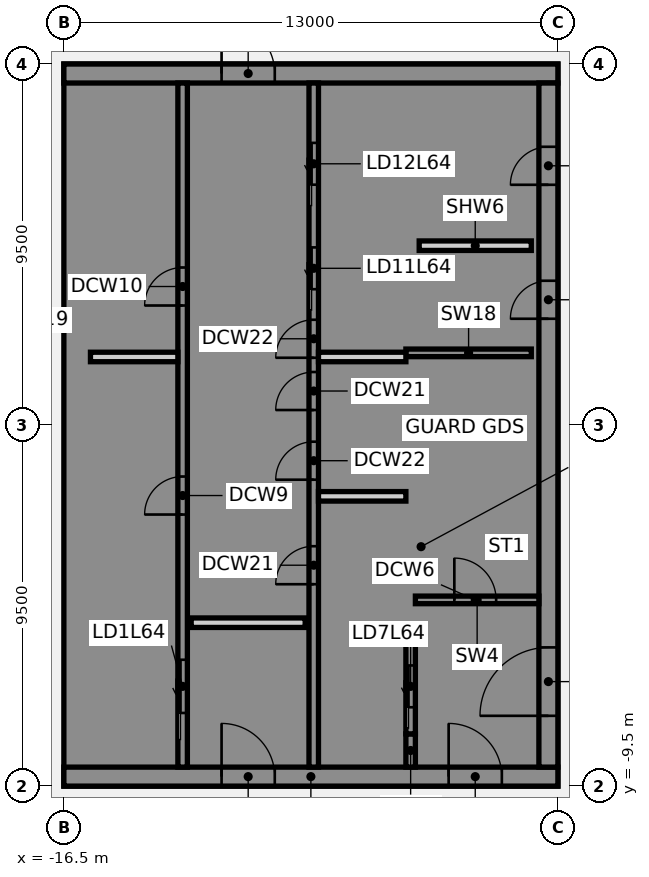
"""IFC4 building model, lengths in metres.
Left out: names, types, materials, properties, quantities, classifications, styles, units other than length and angle.
Written with IfcOpenShell. Run it as: python <this file> out.ifc"""

import sys

from ifc_helpers import new_model, si_unit, direction, frame, frame_2d, origin, place, context, subcontext, project, spatial, polyline, rectangle, outline, extrude, element, fill, save


model = new_model("IFC4")
c1 = context("Model", 3, precision=1e-05, world=origin(), true_north=direction((0.0, 1.0)))
c2 = subcontext(c1, "Body", "Model", "MODEL_VIEW")
j1 = project(units=[si_unit("LENGTHUNIT", "METRE"), si_unit("PLANEANGLEUNIT", "RADIAN")], contexts=[c1])
p1 = place(None, origin())
s1 = spatial("IfcSite", under=j1, at=p1, CompositionType="ELEMENT")
p2 = place(p1, origin())
s2 = spatial("IfcBuilding", under=s1, at=p2, CompositionType="ELEMENT")
p3 = place(p2, frame((0.0, 0.0, 252.3)))
s3 = spatial("IfcBuildingStorey", under=s2, at=p3, CompositionType="ELEMENT", Elevation=252.3)
p4 = place(p3, frame((-16.5, -9.25, 0.0), z_axis=(0.0, 0.0, 1.0), x_axis=(1.0, 0.0, 0.0)))
e1 = element("IfcWall", 1, at=p4, inside=s3, PredefinedType="SHEAR", context=c2, shape_type="SweptSolid", body=[
    extrude(rectangle(XDim=13.0, YDim=0.5, at=frame_2d((6.5, 0.0))), origin(), (0.0, 0.0, 1.0), 4.36),
])
p5 = place(p4, frame((4.15, 0.0, 0.0)))
e2 = element("IfcOpeningElement", 2, at=p5, cuts=e1, PredefinedType="OPENING", context=c2, shape_type="SweptSolid", body=[
    extrude(rectangle(XDim=1.4, YDim=2.1, at=frame_2d((0.7, 1.05))), frame((0.0, 0.26, 0.0), z_axis=(0.0, -1.0, 0.0), x_axis=(1.0, 0.0, 0.0)), (0.0, 0.0, 1.0), 0.52),
])
p6 = place(p4, frame((10.125, 0.0, 0.0)))
e3 = element("IfcOpeningElement", 3, at=p6, cuts=e1, PredefinedType="OPENING", context=c2, shape_type="SweptSolid", body=[
    extrude(rectangle(XDim=1.4, YDim=2.1, at=frame_2d((0.7, 1.05))), frame((0.0, 0.26, 0.0), z_axis=(0.0, -1.0, 0.0), x_axis=(1.0, 0.0, 0.0)), (0.0, 0.0, 1.0), 0.52),
])
p7 = place(p3, origin())
e4 = element("IfcWall", 4, at=p7, inside=s3, PredefinedType="SHEAR", context=c2, shape_type="SweptSolid", body=[
    extrude(outline(polyline([(-13.5, -8.125), (-16.0, -8.125), (-16.0, -5.625), (-13.5, -5.625), (-13.5, -5.375), (-16.0, -5.375), (-16.0, 5.375), (-13.5, 5.375), (-13.5, 5.625), (-16.0, 5.625), (-16.0, 8.125), (-13.5, 8.125), (-13.5, 9.0), (-16.0, 9.0), (-16.5, 9.0), (-16.5, -9.0), (-16.0, -9.0), (-13.5, -9.0), (-13.5, -8.125)])), origin(), (0.0, 0.0, 1.0), 4.36),
])
p8 = place(p3, frame((-16.5, 9.25, 0.0), z_axis=(0.0, 0.0, 1.0), x_axis=(1.0, 0.0, 0.0)))
e5 = element("IfcWall", 5, at=p8, inside=s3, PredefinedType="SHEAR", context=c2, shape_type="SweptSolid", body=[
    extrude(rectangle(XDim=13.0, YDim=0.5, at=frame_2d((6.5, 0.0))), origin(), (0.0, 0.0, 1.0), 4.36),
])
p9 = place(p8, frame((4.15, 0.0, 0.0)))
e6 = element("IfcOpeningElement", 6, at=p9, cuts=e5, PredefinedType="OPENING", context=c2, shape_type="SweptSolid", body=[
    extrude(rectangle(XDim=1.4, YDim=2.1, at=frame_2d((0.7, 1.05))), frame((0.0, 0.26, 0.0), z_axis=(0.0, -1.0, 0.0), x_axis=(1.0, 0.0, 0.0)), (0.0, 0.0, 1.0), 0.52),
])
p10 = place(p3, origin())
e7 = element("IfcWall", 7, at=p10, inside=s3, PredefinedType="SHEAR", context=c2, shape_type="SweptSolid", body=[
    extrude(outline(polyline([(-9.8, -5.375), (-9.8, -5.625), (-7.5, -5.625), (-7.25, -5.625), (-7.25, 9.0), (-7.5, 9.0), (-9.8, 9.0), (-9.8, 8.125), (-7.5, 8.125), (-7.5, 5.625), (-9.8, 5.625), (-9.8, 5.375), (-7.5, 5.375), (-7.5, 2.875), (-9.8, 2.875), (-9.8, 2.625), (-7.5, 2.625), (-7.5, -5.375), (-9.8, -5.375)])), origin(), (0.0, 0.0, 1.0), 4.36),
])
p11 = place(p3, origin())
e8 = element("IfcWall", 8, at=p11, inside=s3, PredefinedType="SHEAR", context=c2, shape_type="SweptSolid", body=[
    extrude(outline(polyline([(-7.5, -8.125), (-9.55, -8.125), (-9.55, -5.625), (-9.8, -5.625), (-9.8, -8.125), (-9.8, -9.0), (-7.5, -9.0), (-7.5, -8.125)])), origin(), (0.0, 0.0, 1.0), 4.36),
])
p12 = place(p3, frame((-7.375, -9.0, 0.0), z_axis=(0.0, 0.0, 1.0), x_axis=(0.0, 1.0, 0.0)))
e9 = element("IfcWall", 9, at=p12, inside=s3, PredefinedType="SHEAR", context=c2, shape_type="SweptSolid", body=[
    extrude(rectangle(XDim=0.875, YDim=0.25, at=frame_2d((0.438, 0.0))), origin(), (0.0, 0.0, 1.0), 4.36),
])
p13 = place(p3, frame((-7.5, 1.9, 0.0), z_axis=(0.0, 0.0, 1.0), x_axis=(1.0, 0.0, 0.0)))
e10 = element("IfcWall", 10, at=p13, inside=s3, PredefinedType="SHEAR", context=c2, shape_type="SweptSolid", body=[
    extrude(rectangle(XDim=3.3, YDim=0.2, at=frame_2d((1.65, 0.0))), origin(), (0.0, 0.0, 1.0), 4.36),
])
p14 = place(p3, frame((-13.375, -9.0, 0.0), z_axis=(0.0, 0.0, 1.0), x_axis=(0.0, 1.0, 0.0)))
e11 = element("IfcWall", 11, at=p14, inside=s3, PredefinedType="SHEAR", context=c2, shape_type="SweptSolid", body=[
    extrude(rectangle(XDim=18.0, YDim=0.25, at=frame_2d((9.0, 0.0))), origin(), (0.0, 0.0, 1.0), 4.36),
])
p15 = place(p14, frame((1.425, 0.0, 0.0)))
e12 = element("IfcOpeningElement", 12, at=p15, cuts=e11, PredefinedType="OPENING", context=c2, shape_type="SweptSolid", body=[
    extrude(rectangle(XDim=1.4, YDim=2.1, at=frame_2d((0.7, 1.05))), frame((0.0, 0.135, 0.0), z_axis=(0.0, -1.0, 0.0), x_axis=(1.0, 0.0, 0.0)), (0.0, 0.0, 1.0), 0.27),
])
p16 = place(p14, frame((6.646, 0.0, 0.0)))
e13 = element("IfcOpeningElement", 13, at=p16, cuts=e11, PredefinedType="OPENING", context=c2, shape_type="SweptSolid", body=[
    extrude(rectangle(XDim=1.0, YDim=2.1, at=frame_2d((0.5, 1.05))), frame((0.0, 0.135, 0.0), z_axis=(0.0, -1.0, 0.0), x_axis=(1.0, 0.0, 0.0)), (0.0, 0.0, 1.0), 0.27),
])
p17 = place(p14, frame((12.146, 0.0, 0.0)))
e14 = element("IfcOpeningElement", 14, at=p17, cuts=e11, PredefinedType="OPENING", context=c2, shape_type="SweptSolid", body=[
    extrude(rectangle(XDim=1.0, YDim=2.1, at=frame_2d((0.5, 1.05))), frame((0.0, 0.135, 0.0), z_axis=(0.0, -1.0, 0.0), x_axis=(1.0, 0.0, 0.0)), (0.0, 0.0, 1.0), 0.27),
])
p18 = place(p3, frame((-9.925, -9.0, 0.0), z_axis=(0.0, 0.0, 1.0), x_axis=(0.0, 1.0, 0.0)))
e15 = element("IfcWall", 15, at=p18, inside=s3, PredefinedType="SHEAR", context=c2, shape_type="SweptSolid", body=[
    extrude(rectangle(XDim=18.0, YDim=0.25, at=frame_2d((9.0, 0.0))), origin(), (0.0, 0.0, 1.0), 4.36),
])
p19 = place(p18, frame((12.575, 0.0, 0.0)))
e16 = element("IfcOpeningElement", 16, at=p19, cuts=e15, PredefinedType="OPENING", context=c2, shape_type="SweptSolid", body=[
    extrude(rectangle(XDim=1.1, YDim=2.1, at=frame_2d((0.55, 1.05))), frame((0.0, 0.135, 0.0), z_axis=(0.0, -1.0, 0.0), x_axis=(1.0, 0.0, 0.0)), (0.0, 0.0, 1.0), 0.27),
])
p20 = place(p18, frame((15.325, 0.0, 0.0)))
e17 = element("IfcOpeningElement", 17, at=p20, cuts=e15, PredefinedType="OPENING", context=c2, shape_type="SweptSolid", body=[
    extrude(rectangle(XDim=1.1, YDim=2.1, at=frame_2d((0.55, 1.05))), frame((0.0, 0.135, 0.0), z_axis=(0.0, -1.0, 0.0), x_axis=(1.0, 0.0, 0.0)), (0.0, 0.0, 1.0), 0.27),
])
p21 = place(p18, frame((4.812, 0.0, 0.0)))
e18 = element("IfcOpeningElement", 18, at=p21, cuts=e15, PredefinedType="OPENING", context=c2, shape_type="SweptSolid", body=[
    extrude(rectangle(XDim=1.0, YDim=2.1, at=frame_2d((0.5, 1.05))), frame((0.0, 0.135, 0.0), z_axis=(0.0, -1.0, 0.0), x_axis=(1.0, 0.0, 0.0)), (0.0, 0.0, 1.0), 0.27),
])
p22 = place(p18, frame((7.562, 0.0, 0.0)))
e19 = element("IfcOpeningElement", 19, at=p22, cuts=e15, PredefinedType="OPENING", context=c2, shape_type="SweptSolid", body=[
    extrude(rectangle(XDim=1.0, YDim=2.1, at=frame_2d((0.5, 1.05))), frame((0.0, 0.135, 0.0), z_axis=(0.0, -1.0, 0.0), x_axis=(1.0, 0.0, 0.0)), (0.0, 0.0, 1.0), 0.27),
])
p23 = place(p18, frame((9.396, 0.0, 0.0)))
e20 = element("IfcOpeningElement", 20, at=p23, cuts=e15, PredefinedType="OPENING", context=c2, shape_type="SweptSolid", body=[
    extrude(rectangle(XDim=1.0, YDim=2.1, at=frame_2d((0.5, 1.05))), frame((0.0, 0.135, 0.0), z_axis=(0.0, -1.0, 0.0), x_axis=(1.0, 0.0, 0.0)), (0.0, 0.0, 1.0), 0.27),
])
p24 = place(p18, frame((10.771, 0.0, 0.0)))
e21 = element("IfcOpeningElement", 21, at=p24, cuts=e15, PredefinedType="OPENING", context=c2, shape_type="SweptSolid", body=[
    extrude(rectangle(XDim=1.0, YDim=2.1, at=frame_2d((0.5, 1.05))), frame((0.0, 0.135, 0.0), z_axis=(0.0, -1.0, 0.0), x_axis=(1.0, 0.0, 0.0)), (0.0, 0.0, 1.0), 0.27),
])
p25 = place(p3, frame((-7.375, -8.125, 0.0), z_axis=(0.0, 0.0, 1.0), x_axis=(0.0, 1.0, 0.0)))
e22 = element("IfcWall", 22, at=p25, inside=s3, PredefinedType="SHEAR", context=c2, shape_type="SweptSolid", body=[
    extrude(rectangle(XDim=2.5, YDim=0.25, at=frame_2d((1.25, 0.0))), origin(), (0.0, 0.0, 1.0), 4.36),
])
p26 = place(p25, frame((0.7, 0.0, 0.0)))
e23 = element("IfcOpeningElement", 23, at=p26, cuts=e22, PredefinedType="OPENING", context=c2, shape_type="SweptSolid", body=[
    extrude(rectangle(XDim=1.1, YDim=2.1, at=frame_2d((0.55, 1.05))), frame((0.0, 0.135, 0.0), z_axis=(0.0, -1.0, 0.0), x_axis=(1.0, 0.0, 0.0)), (0.0, 0.0, 1.0), 0.27),
])
p27 = place(p3, frame((-3.75, -9.0, 0.0), z_axis=(0.0, 0.0, 1.0), x_axis=(0.0, 1.0, 0.0)))
e24 = element("IfcWall", 24, at=p27, inside=s3, PredefinedType="SHEAR", context=c2, shape_type="SweptSolid", body=[
    extrude(rectangle(XDim=18.0, YDim=0.5, at=frame_2d((9.0, 0.0))), origin(), (0.0, 0.0, 1.0), 4.36),
])
p28 = place(p27, frame((1.35, 0.0, 0.0)))
e25 = element("IfcOpeningElement", 25, at=p28, cuts=e24, PredefinedType="OPENING", context=c2, shape_type="SweptSolid", body=[
    extrude(rectangle(XDim=1.8, YDim=2.1, at=frame_2d((0.9, 1.05))), frame((0.0, 0.26, 0.0), z_axis=(0.0, -1.0, 0.0), x_axis=(1.0, 0.0, 0.0)), (0.0, 0.0, 1.0), 0.52),
])
p29 = place(p27, frame((11.798, 0.0, 0.0)))
e26 = element("IfcOpeningElement", 26, at=p29, cuts=e24, PredefinedType="OPENING", context=c2, shape_type="SweptSolid", body=[
    extrude(rectangle(XDim=1.0, YDim=2.1, at=frame_2d((0.5, 1.05))), frame((0.0, 0.26, 0.0), z_axis=(0.0, -1.0, 0.0), x_axis=(1.0, 0.0, 0.0)), (0.0, 0.0, 1.0), 0.52),
])
p30 = place(p27, frame((15.323, 0.0, 0.0)))
e27 = element("IfcOpeningElement", 27, at=p30, cuts=e24, PredefinedType="OPENING", context=c2, shape_type="SweptSolid", body=[
    extrude(rectangle(XDim=1.0, YDim=2.1, at=frame_2d((0.5, 1.05))), frame((0.0, 0.26, 0.0), z_axis=(0.0, -1.0, 0.0), x_axis=(1.0, 0.0, 0.0)), (0.0, 0.0, 1.0), 0.52),
])
p31 = place(p3, frame((-7.15, 4.72, 0.0), z_axis=(0.0, 0.0, 1.0), x_axis=(1.0, 0.0, 0.0)))
e28 = element("IfcWall", 28, at=p31, inside=s3, PredefinedType="PARTITIONING", context=c2, shape_type="SweptSolid", body=[
    extrude(rectangle(XDim=2.95, YDim=0.25, at=frame_2d((1.475, 0.0))), origin(), (0.0, 0.0, 1.0), 4.36),
])
p32 = place(p3, frame((-7.25, -4.6, 0.0), z_axis=(0.0, 0.0, 1.0), x_axis=(1.0, 0.0, 0.0)))
e29 = element("IfcWall", 29, at=p32, inside=s3, PredefinedType="SHEAR", context=c2, shape_type="SweptSolid", body=[
    extrude(rectangle(XDim=3.25, YDim=0.2, at=frame_2d((1.625, 0.0))), origin(), (0.0, 0.0, 1.0), 4.36),
])
p33 = place(p32, frame((1.025, 0.0, 0.0)))
e30 = element("IfcOpeningElement", 30, at=p33, cuts=e29, PredefinedType="OPENING", context=c2, shape_type="SweptSolid", body=[
    extrude(rectangle(XDim=1.1, YDim=2.1, at=frame_2d((0.55, 1.05))), frame((0.0, 0.11, 0.0), z_axis=(0.0, -1.0, 0.0), x_axis=(1.0, 0.0, 0.0)), (0.0, 0.0, 1.0), 0.22),
])
p34 = place(p3, frame((-13.15, -5.2, 0.0), z_axis=(0.0, 0.0, 1.0), x_axis=(1.0, 0.0, 0.0)))
e31 = element("IfcWall", 31, at=p34, inside=s3, PredefinedType="PARTITIONING", context=c2, shape_type="SweptSolid", body=[
    extrude(rectangle(XDim=3.0, YDim=0.25, at=frame_2d((1.5, 0.0))), origin(), (0.0, 0.0, 1.0), 4.36),
])
for number, where, z_axis, x_axis in (
    (32, (-15.8, 1.792, 0.0), (0.0, 0.0, 1.0), (1.0, 0.0, 0.0)),
    (33, (-9.8, -1.875, 0.0), (0.0, 0.0, 1.0), (1.0, 0.0, 0.0)),
    (34, (-9.8, 1.792, 0.0), (0.0, 0.0, 1.0), (1.0, 0.0, 0.0)),
):
    element("IfcWall", number, at=place(p3, frame(where, z_axis=z_axis, x_axis=x_axis)), inside=s3, PredefinedType="PARTITIONING", context=c2, shape_type="SweptSolid", body=[
        extrude(rectangle(XDim=2.3, YDim=0.25, at=frame_2d((1.15, 0.0))), origin(), (0.0, 0.0, 1.0), 4.36),
    ])
p35 = place(p5, origin())
e35 = element("IfcDoor", 35, at=p35, inside=s3, OperationType="SINGLE_SWING_LEFT", PredefinedType="DOOR", context=c2, shape_type="SweptSolid", body=[
    extrude(rectangle(XDim=1.4, YDim=2.1, at=frame_2d((0.7, 1.05))), frame((0.0, 0.025, 0.0), z_axis=(0.0, -1.0, 0.0), x_axis=(1.0, 0.0, 0.0)), (0.0, 0.0, 1.0), 0.05),
])
fill(e2, e35)
p36 = place(p6, origin())
e36 = element("IfcDoor", 36, at=p36, inside=s3, OperationType="SINGLE_SWING_LEFT", PredefinedType="DOOR", context=c2, shape_type="SweptSolid", body=[
    extrude(rectangle(XDim=1.4, YDim=2.1, at=frame_2d((0.7, 1.05))), frame((0.0, 0.025, 0.0), z_axis=(0.0, -1.0, 0.0), x_axis=(1.0, 0.0, 0.0)), (0.0, 0.0, 1.0), 0.05),
])
fill(e3, e36)
p37 = place(p28, origin())
e37 = element("IfcDoor", 37, at=p37, inside=s3, OperationType="SINGLE_SWING_LEFT", PredefinedType="DOOR", context=c2, shape_type="SweptSolid", body=[
    extrude(rectangle(XDim=1.8, YDim=2.1, at=frame_2d((0.9, 1.05))), frame((0.0, 0.025, 0.0), z_axis=(0.0, -1.0, 0.0), x_axis=(1.0, 0.0, 0.0)), (0.0, 0.0, 1.0), 0.05),
])
fill(e25, e37)
p38 = place(p29, origin())
e38 = element("IfcDoor", 38, at=p38, inside=s3, OperationType="SINGLE_SWING_LEFT", PredefinedType="DOOR", context=c2, shape_type="SweptSolid", body=[
    extrude(rectangle(XDim=1.0, YDim=2.1, at=frame_2d((0.5, 1.05))), frame((0.0, 0.225, 0.0), z_axis=(0.0, -1.0, 0.0), x_axis=(1.0, 0.0, 0.0)), (0.0, 0.0, 1.0), 0.05),
])
fill(e26, e38)
p39 = place(p30, origin())
e39 = element("IfcDoor", 39, at=p39, inside=s3, OperationType="SINGLE_SWING_LEFT", PredefinedType="DOOR", context=c2, shape_type="SweptSolid", body=[
    extrude(rectangle(XDim=1.0, YDim=2.1, at=frame_2d((0.5, 1.05))), frame((0.0, 0.225, 0.0), z_axis=(0.0, -1.0, 0.0), x_axis=(1.0, 0.0, 0.0)), (0.0, 0.0, 1.0), 0.05),
])
fill(e27, e39)
p40 = place(p33, origin())
e40 = element("IfcDoor", 40, at=p40, inside=s3, OperationType="SINGLE_SWING_LEFT", PredefinedType="DOOR", context=c2, shape_type="SweptSolid", body=[
    extrude(rectangle(XDim=1.1, YDim=2.1, at=frame_2d((0.55, 1.05))), frame((0.0, 0.025, 0.0), z_axis=(0.0, -1.0, 0.0), x_axis=(1.0, 0.0, 0.0)), (0.0, 0.0, 1.0), 0.05),
])
fill(e30, e40)
p41 = place(p15, origin())
e41 = element("IfcDoor", 41, at=p41, inside=s3, OperationType="SLIDING_TO_LEFT", PredefinedType="DOOR", context=c2, shape_type="SweptSolid", body=[
    extrude(rectangle(XDim=1.4, YDim=2.1, at=frame_2d((0.7, 1.05))), frame((0.0, 0.025, 0.0), z_axis=(0.0, -1.0, 0.0), x_axis=(1.0, 0.0, 0.0)), (0.0, 0.0, 1.0), 0.05),
])
fill(e12, e41)
p42 = place(p26, origin())
e42 = element("IfcDoor", 42, at=p42, inside=s3, OperationType="SLIDING_TO_LEFT", PredefinedType="DOOR", context=c2, shape_type="SweptSolid", body=[
    extrude(rectangle(XDim=1.1, YDim=2.1, at=frame_2d((0.55, 1.05))), frame((0.0, 0.025, 0.0), z_axis=(0.0, -1.0, 0.0), x_axis=(1.0, 0.0, 0.0)), (0.0, 0.0, 1.0), 0.05),
])
fill(e23, e42)
p43 = place(p19, origin())
e43 = element("IfcDoor", 43, at=p43, inside=s3, OperationType="SLIDING_TO_LEFT", PredefinedType="DOOR", context=c2, shape_type="SweptSolid", body=[
    extrude(rectangle(XDim=1.1, YDim=2.1, at=frame_2d((0.55, 1.05))), frame((0.0, 0.025, 0.0), z_axis=(0.0, -1.0, 0.0), x_axis=(1.0, 0.0, 0.0)), (0.0, 0.0, 1.0), 0.05),
])
fill(e16, e43)
p44 = place(p20, origin())
e44 = element("IfcDoor", 44, at=p44, inside=s3, OperationType="SLIDING_TO_LEFT", PredefinedType="DOOR", context=c2, shape_type="SweptSolid", body=[
    extrude(rectangle(XDim=1.1, YDim=2.1, at=frame_2d((0.55, 1.05))), frame((0.0, 0.025, 0.0), z_axis=(0.0, -1.0, 0.0), x_axis=(1.0, 0.0, 0.0)), (0.0, 0.0, 1.0), 0.05),
])
fill(e17, e44)
p45 = place(p9, origin())
e45 = element("IfcDoor", 45, at=p45, inside=s3, OperationType="SINGLE_SWING_LEFT", PredefinedType="DOOR", context=c2, shape_type="SweptSolid", body=[
    extrude(rectangle(XDim=1.4, YDim=2.1, at=frame_2d((0.7, 1.05))), frame((0.0, 0.025, 0.0), z_axis=(0.0, -1.0, 0.0), x_axis=(1.0, 0.0, 0.0)), (0.0, 0.0, 1.0), 0.05),
])
fill(e6, e45)
p46 = place(p16, origin())
e46 = element("IfcDoor", 46, at=p46, inside=s3, OperationType="SINGLE_SWING_LEFT", PredefinedType="DOOR", context=c2, shape_type="SweptSolid", body=[
    extrude(rectangle(XDim=1.0, YDim=2.1, at=frame_2d((0.5, 1.05))), frame((0.0, 0.025, 0.0), z_axis=(0.0, -1.0, 0.0), x_axis=(1.0, 0.0, 0.0)), (0.0, 0.0, 1.0), 0.05),
])
fill(e13, e46)
p47 = place(p17, origin())
e47 = element("IfcDoor", 47, at=p47, inside=s3, OperationType="SINGLE_SWING_LEFT", PredefinedType="DOOR", context=c2, shape_type="SweptSolid", body=[
    extrude(rectangle(XDim=1.0, YDim=2.1, at=frame_2d((0.5, 1.05))), frame((0.0, 0.025, 0.0), z_axis=(0.0, -1.0, 0.0), x_axis=(1.0, 0.0, 0.0)), (0.0, 0.0, 1.0), 0.05),
])
fill(e14, e47)
p48 = place(p21, origin())
e48 = element("IfcDoor", 48, at=p48, inside=s3, OperationType="SINGLE_SWING_LEFT", PredefinedType="DOOR", context=c2, shape_type="SweptSolid", body=[
    extrude(rectangle(XDim=1.0, YDim=2.1, at=frame_2d((0.5, 1.05))), frame((0.0, 0.025, 0.0), z_axis=(0.0, -1.0, 0.0), x_axis=(1.0, 0.0, 0.0)), (0.0, 0.0, 1.0), 0.05),
])
fill(e18, e48)
p49 = place(p22, origin())
e49 = element("IfcDoor", 49, at=p49, inside=s3, OperationType="SINGLE_SWING_LEFT", PredefinedType="DOOR", context=c2, shape_type="SweptSolid", body=[
    extrude(rectangle(XDim=1.0, YDim=2.1, at=frame_2d((0.5, 1.05))), frame((0.0, 0.025, 0.0), z_axis=(0.0, -1.0, 0.0), x_axis=(1.0, 0.0, 0.0)), (0.0, 0.0, 1.0), 0.05),
])
fill(e19, e49)
p50 = place(p23, origin())
e50 = element("IfcDoor", 50, at=p50, inside=s3, OperationType="SINGLE_SWING_LEFT", PredefinedType="DOOR", context=c2, shape_type="SweptSolid", body=[
    extrude(rectangle(XDim=1.0, YDim=2.1, at=frame_2d((0.5, 1.05))), frame((0.0, 0.025, 0.0), z_axis=(0.0, -1.0, 0.0), x_axis=(1.0, 0.0, 0.0)), (0.0, 0.0, 1.0), 0.05),
])
fill(e20, e50)
p51 = place(p24, origin())
e51 = element("IfcDoor", 51, at=p51, inside=s3, OperationType="SINGLE_SWING_LEFT", PredefinedType="DOOR", context=c2, shape_type="SweptSolid", body=[
    extrude(rectangle(XDim=1.0, YDim=2.1, at=frame_2d((0.5, 1.05))), frame((0.0, 0.025, 0.0), z_axis=(0.0, -1.0, 0.0), x_axis=(1.0, 0.0, 0.0)), (0.0, 0.0, 1.0), 0.05),
])
fill(e21, e51)
save(model, sys.argv[1])
